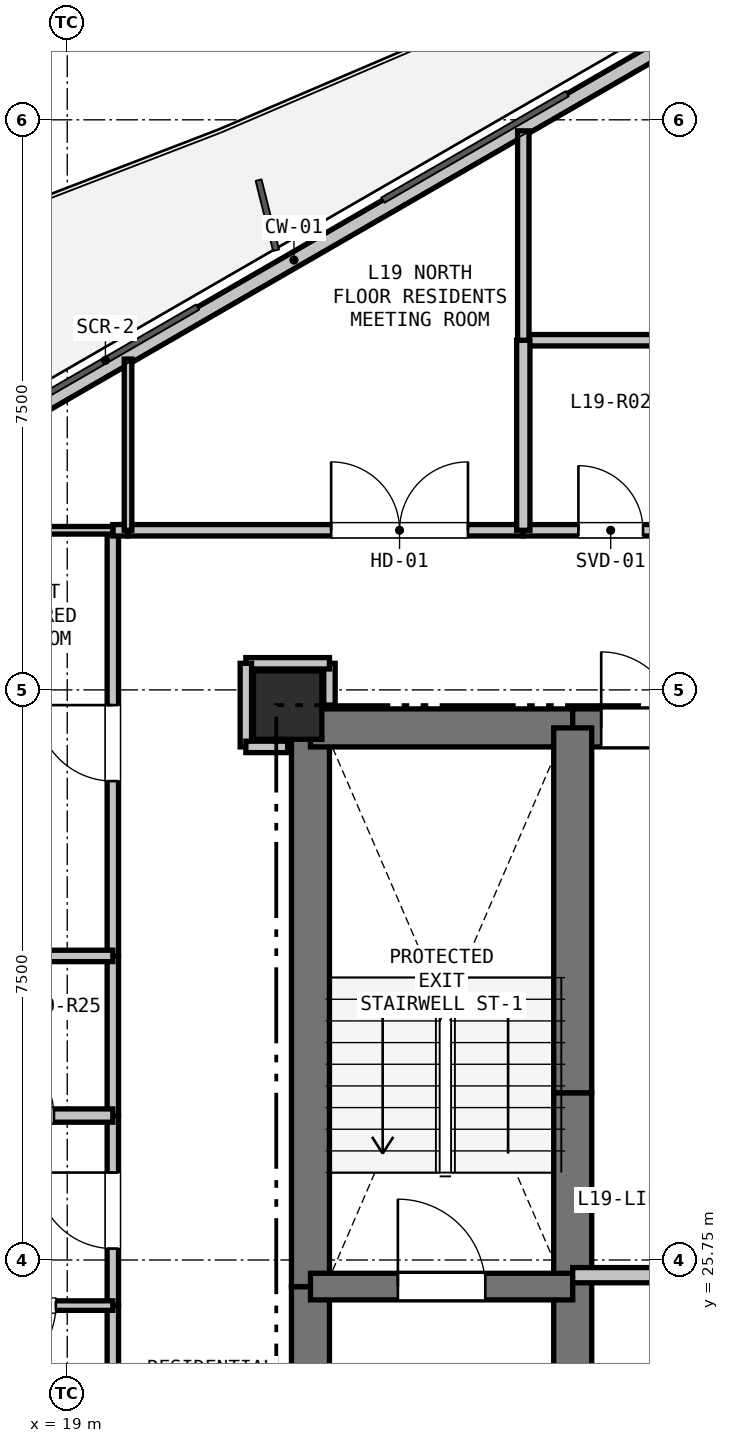
"""IFC4 building model, lengths in metres.
Left out: names, types, materials, properties, quantities, classifications, styles, units other than length and angle.
Written with IfcOpenShell. Run it as: python <this file> out.ifc"""

import sys

from ifc_helpers import new_model, si_unit, direction, frame, frame_2d, origin, origin_2d, place, context, subcontext, project, spatial, rectangle, extrude, element, fill, save


model = new_model("IFC4")
c1 = context("Model", 3, precision=1e-05, world=origin(), true_north=direction((0.0, 1.0)))
c2 = subcontext(c1, "Body", "Model", "MODEL_VIEW")
j1 = project(units=[si_unit("LENGTHUNIT", "METRE"), si_unit("PLANEANGLEUNIT", "RADIAN")], contexts=[c1])
p1 = place(None, origin())
s1 = spatial("IfcSite", under=j1, at=p1, CompositionType="ELEMENT")
p2 = place(p1, origin())
s2 = spatial("IfcBuilding", under=s1, at=p2, CompositionType="ELEMENT")
p3 = place(p2, frame((0.0, 0.0, 73.5)))
s3 = spatial("IfcBuildingStorey", under=s2, at=p3, CompositionType="ELEMENT", Elevation=73.5)
p4 = place(p3, frame((21.9, 33.05, 0.0), z_axis=(0.0, 0.0, 1.0), x_axis=(1.0, 0.0, 0.0)))
e1 = element("IfcColumn", 1, at=p4, inside=s3, PredefinedType="COLUMN", context=c2, shape_type="SweptSolid", body=[
    extrude(rectangle(XDim=0.9, YDim=0.9, at=origin_2d()), origin(), (0.0, 0.0, 1.0), 3.3),
])
p5 = place(p3, frame((17.12, 36.097, 0.0), z_axis=(0.0, 0.0, 1.0), x_axis=(0.866027010039, 0.499997217876, 0.0)))
e2 = element("IfcWall", 2, at=p5, inside=s3, PredefinedType="PARAPET", context=c2, shape_type="SweptSolid", body=[
    extrude(rectangle(XDim=11.229, YDim=0.2, at=frame_2d((5.615, 0.0))), origin(), (0.0, 0.0, 1.0), 0.2),
])
p6 = place(p3, frame((22.2, 20.75, 0.0), z_axis=(0.0, 0.0, 1.0), x_axis=(0.0, 1.0, 0.0)))
e3 = element("IfcWall", 3, at=p6, inside=s3, PredefinedType="SHEAR", context=c2, shape_type="SweptSolid", body=[
    extrude(rectangle(XDim=4.65, YDim=0.5, at=frame_2d((2.325, 0.0))), origin(), (0.0, 0.0, 1.0), 3.05),
])
p7 = place(p3, frame((22.2, 25.4, 0.0), z_axis=(0.0, 0.0, 1.0), x_axis=(0.0, 1.0, 0.0)))
e4 = element("IfcWall", 4, at=p7, inside=s3, PredefinedType="SHEAR", context=c2, shape_type="SweptSolid", body=[
    extrude(rectangle(XDim=7.35, YDim=0.5, at=frame_2d((3.675, 0.0))), origin(), (0.0, 0.0, 1.0), 3.05),
])
p8 = place(p3, frame((22.2, 32.75, 0.0), z_axis=(0.0, 0.0, 1.0), x_axis=(1.0, 0.0, 0.0)))
e5 = element("IfcWall", 5, at=p8, inside=s3, PredefinedType="SHEAR", context=c2, shape_type="SweptSolid", body=[
    extrude(rectangle(XDim=3.45, YDim=0.5, at=frame_2d((1.725, 0.0))), origin(), (0.0, 0.0, 1.0), 3.05),
])
p9 = place(p3, frame((25.65, 32.75, 0.0), z_axis=(0.0, 0.0, 1.0), x_axis=(1.0, 0.0, 0.0)))
e6 = element("IfcWall", 6, at=p9, inside=s3, PredefinedType="SHEAR", context=c2, shape_type="SweptSolid", body=[
    extrude(rectangle(XDim=1.75, YDim=0.5, at=frame_2d((0.875, 0.0))), origin(), (0.0, 0.0, 1.0), 3.05),
])
p10 = place(p9, frame((0.375, 0.0, 0.0)))
e7 = element("IfcOpeningElement", 7, at=p10, cuts=e6, PredefinedType="OPENING", context=c2, shape_type="SweptSolid", body=[
    extrude(rectangle(XDim=1.0, YDim=2.15, at=frame_2d((0.5, 1.075))), frame((0.0, 0.26, 0.0), z_axis=(0.0, -1.0, 0.0), x_axis=(1.0, 0.0, 0.0)), (0.0, 0.0, 1.0), 0.52),
])
p11 = place(p3, frame((25.65, 22.75, 0.0), z_axis=(0.0, 0.0, 1.0), x_axis=(0.0, 1.0, 0.0)))
e8 = element("IfcWall", 8, at=p11, inside=s3, PredefinedType="SHEAR", context=c2, shape_type="SweptSolid", body=[
    extrude(rectangle(XDim=2.8, YDim=0.5, at=frame_2d((1.4, 0.0))), origin(), (0.0, 0.0, 1.0), 3.05),
])
p12 = place(p3, frame((25.65, 25.55, 0.0), z_axis=(0.0, 0.0, 1.0), x_axis=(0.0, 1.0, 0.0)))
e9 = element("IfcWall", 9, at=p12, inside=s3, PredefinedType="SHEAR", context=c2, shape_type="SweptSolid", body=[
    extrude(rectangle(XDim=2.4, YDim=0.5, at=frame_2d((1.2, 0.0))), origin(), (0.0, 0.0, 1.0), 3.05),
])
p13 = place(p3, frame((25.65, 27.95, 0.0), z_axis=(0.0, 0.0, 1.0), x_axis=(0.0, 1.0, 0.0)))
e10 = element("IfcWall", 10, at=p13, inside=s3, PredefinedType="SHEAR", context=c2, shape_type="SweptSolid", body=[
    extrude(rectangle(XDim=4.8, YDim=0.5, at=frame_2d((2.4, 0.0))), origin(), (0.0, 0.0, 1.0), 3.05),
])
p14 = place(p3, frame((22.2, 25.4, 0.0), z_axis=(0.0, 0.0, 1.0), x_axis=(1.0, 0.0, 0.0)))
e11 = element("IfcWall", 11, at=p14, inside=s3, PredefinedType="SHEAR", context=c2, shape_type="SweptSolid", body=[
    extrude(rectangle(XDim=3.45, YDim=0.35, at=frame_2d((1.725, 0.0))), origin(), (0.0, 0.0, 1.0), 3.05),
])
p15 = place(p14, frame((1.15, 0.0, 0.0)))
e12 = element("IfcOpeningElement", 12, at=p15, cuts=e11, PredefinedType="OPENING", context=c2, shape_type="SweptSolid", body=[
    extrude(rectangle(XDim=1.15, YDim=2.15, at=frame_2d((0.575, 1.075))), frame((0.0, 0.185, 0.0), z_axis=(0.0, -1.0, 0.0), x_axis=(1.0, 0.0, 0.0)), (0.0, 0.0, 1.0), 0.37),
])
p16 = place(p3, frame((25.65, 25.55, 0.0), z_axis=(0.0, 0.0, 1.0), x_axis=(1.0, 0.0, 0.0)))
e13 = element("IfcWall", 13, at=p16, inside=s3, PredefinedType="PARTITIONING", context=c2, shape_type="SweptSolid", body=[
    extrude(rectangle(XDim=4.95, YDim=0.2, at=frame_2d((2.475, 0.0))), origin(), (0.0, 0.0, 1.0), 3.05),
])
p17 = place(p3, frame((19.6, 21.15, 0.0), z_axis=(0.0, 0.0, 1.0), x_axis=(0.0, 1.0, 0.0)))
e14 = element("IfcWall", 14, at=p17, inside=s3, PredefinedType="PARTITIONING", context=c2, shape_type="SweptSolid", body=[
    extrude(rectangle(XDim=4.0, YDim=0.15, at=frame_2d((2.0, 0.0))), origin(), (0.0, 0.0, 1.0), 2.423),
])
p18 = place(p3, frame((19.6, 25.15, 0.0), z_axis=(0.0, 0.0, 1.0), x_axis=(0.0, 1.0, 0.0)))
e15 = element("IfcWall", 15, at=p18, inside=s3, PredefinedType="PARTITIONING", context=c2, shape_type="SweptSolid", body=[
    extrude(rectangle(XDim=2.5, YDim=0.15, at=frame_2d((1.25, 0.0))), origin(), (0.0, 0.0, 1.0), 3.05),
])
p19 = place(p18, frame((0.75, 0.0, 0.0)))
e16 = element("IfcOpeningElement", 16, at=p19, cuts=e15, PredefinedType="OPENING", context=c2, shape_type="SweptSolid", body=[
    extrude(rectangle(XDim=1.0, YDim=2.15, at=frame_2d((0.5, 1.075))), frame((0.0, 0.085, 0.0), z_axis=(0.0, -1.0, 0.0), x_axis=(1.0, 0.0, 0.0)), (0.0, 0.0, 1.0), 0.17),
])
p20 = place(p3, frame((19.6, 27.65, 0.0), z_axis=(0.0, 0.0, 1.0), x_axis=(0.0, 1.0, 0.0)))
e17 = element("IfcWall", 17, at=p20, inside=s3, PredefinedType="PARTITIONING", context=c2, shape_type="SweptSolid", body=[
    extrude(rectangle(XDim=2.1, YDim=0.15, at=frame_2d((1.05, 0.0))), origin(), (0.0, 0.0, 1.0), 3.05),
])
p21 = place(p3, frame((19.6, 29.75, 0.0), z_axis=(0.0, 0.0, 1.0), x_axis=(0.0, 1.0, 0.0)))
e18 = element("IfcWall", 18, at=p21, inside=s3, PredefinedType="PARTITIONING", context=c2, shape_type="SweptSolid", body=[
    extrude(rectangle(XDim=5.6, YDim=0.15, at=frame_2d((2.8, 0.0))), origin(), (0.0, 0.0, 1.0), 2.423),
])
p22 = place(p21, frame((2.3, 0.0, 0.0)))
e19 = element("IfcOpeningElement", 19, at=p22, cuts=e18, PredefinedType="OPENING", context=c2, shape_type="SweptSolid", body=[
    extrude(rectangle(XDim=1.0, YDim=2.15, at=frame_2d((0.5, 1.075))), frame((0.0, 0.085, 0.0), z_axis=(0.0, -1.0, 0.0), x_axis=(1.0, 0.0, 0.0)), (0.0, 0.0, 1.0), 0.17),
])
p23 = place(p3, frame((19.6, 35.35, 0.0), z_axis=(0.0, 0.0, 1.0), x_axis=(1.0, 0.0, 0.0)))
e20 = element("IfcWall", 20, at=p23, inside=s3, PredefinedType="PARTITIONING", context=c2, shape_type="SweptSolid", body=[
    extrude(rectangle(XDim=0.2, YDim=0.15, at=frame_2d((0.1, 0.0))), origin(), (0.0, 0.0, 1.0), 3.05),
])
p24 = place(p3, frame((19.8, 35.35, 0.0), z_axis=(0.0, 0.0, 1.0), x_axis=(1.0, 0.0, 0.0)))
e21 = element("IfcWall", 21, at=p24, inside=s3, PredefinedType="PARTITIONING", context=c2, shape_type="SweptSolid", body=[
    extrude(rectangle(XDim=5.2, YDim=0.15, at=frame_2d((2.6, 0.0))), origin(), (0.0, 0.0, 1.0), 3.05),
])
p25 = place(p24, frame((2.672, 0.0, 0.0)))
e22 = element("IfcOpeningElement", 22, at=p25, cuts=e21, PredefinedType="OPENING", context=c2, shape_type="SweptSolid", body=[
    extrude(rectangle(XDim=1.8, YDim=2.2, at=frame_2d((0.9, 1.1))), frame((0.0, 0.085, 0.0), z_axis=(0.0, -1.0, 0.0), x_axis=(1.0, 0.0, 0.0)), (0.0, 0.0, 1.0), 0.17),
])
p26 = place(p3, frame((25.0, 35.35, 0.0), z_axis=(0.0, 0.0, 1.0), x_axis=(1.0, 0.0, 0.0)))
e23 = element("IfcWall", 23, at=p26, inside=s3, PredefinedType="PARTITIONING", context=c2, shape_type="SweptSolid", body=[
    extrude(rectangle(XDim=2.3, YDim=0.15, at=frame_2d((1.15, 0.0))), origin(), (0.0, 0.0, 1.0), 3.05),
])
p27 = place(p26, frame((0.725, 0.0, 0.0)))
e24 = element("IfcOpeningElement", 24, at=p27, cuts=e23, PredefinedType="OPENING", context=c2, shape_type="SweptSolid", body=[
    extrude(rectangle(XDim=0.85, YDim=2.1, at=frame_2d((0.425, 1.05))), frame((0.0, 0.085, 0.0), z_axis=(0.0, -1.0, 0.0), x_axis=(1.0, 0.0, 0.0)), (0.0, 0.0, 1.0), 0.17),
])
p28 = place(p3, frame((22.45, 33.05, 0.0), z_axis=(0.0, 0.0, 1.0), x_axis=(0.0, 1.0, 0.0)))
e25 = element("IfcWall", 25, at=p28, inside=s3, PredefinedType="PARTITIONING", context=c2, shape_type="SweptSolid", body=[
    extrude(rectangle(XDim=0.55, YDim=0.15, at=frame_2d((0.275, 0.0))), origin(), (0.0, 0.0, 1.0), 2.498),
])
p29 = place(p3, frame((22.45, 33.6, 0.0), z_axis=(0.0, 0.0, 1.0), x_axis=(-1.0, 0.0, 0.0)))
e26 = element("IfcWall", 26, at=p29, inside=s3, PredefinedType="PARTITIONING", context=c2, shape_type="SweptSolid", body=[
    extrude(rectangle(XDim=1.1, YDim=0.15, at=frame_2d((0.55, 0.0))), origin(), (0.0, 0.0, 1.0), 3.05),
])
p30 = place(p3, frame((21.35, 33.6, 0.0), z_axis=(0.0, 0.0, 1.0), x_axis=(0.0, -1.0, 0.0)))
e27 = element("IfcWall", 27, at=p30, inside=s3, PredefinedType="PARTITIONING", context=c2, shape_type="SweptSolid", body=[
    extrude(rectangle(XDim=1.1, YDim=0.15, at=frame_2d((0.55, 0.0))), origin(), (0.0, 0.0, 1.0), 2.423),
])
p31 = place(p3, frame((21.35, 32.5, 0.0), z_axis=(0.0, 0.0, 1.0), x_axis=(1.0, 0.0, 0.0)))
e28 = element("IfcWall", 28, at=p31, inside=s3, PredefinedType="PARTITIONING", context=c2, shape_type="SweptSolid", body=[
    extrude(rectangle(XDim=0.55, YDim=0.15, at=frame_2d((0.275, 0.0))), origin(), (0.0, 0.0, 1.0), 2.498),
])
p32 = place(p3, frame((17.15, 27.65, 0.0), z_axis=(0.0, 0.0, 1.0), x_axis=(1.0, 0.0, 0.0)))
e29 = element("IfcWall", 29, at=p32, inside=s3, PredefinedType="PLUMBINGWALL", context=c2, shape_type="SweptSolid", body=[
    extrude(rectangle(XDim=2.45, YDim=0.175, at=frame_2d((1.225, 0.0))), origin(), (0.0, 0.0, 1.0), 3.05),
])
p33 = place(p32, frame((0.775, 0.0, 0.0)))
e30 = element("IfcOpeningElement", 30, at=p33, cuts=e29, PredefinedType="OPENING", context=c2, shape_type="SweptSolid", body=[
    extrude(rectangle(XDim=0.9, YDim=2.1, at=frame_2d((0.45, 1.05))), frame((0.0, 0.097, 0.0), z_axis=(0.0, -1.0, 0.0), x_axis=(1.0, 0.0, 0.0)), (0.0, 0.0, 1.0), 0.195),
])
p34 = place(p3, frame((19.6, 25.15, 0.0), z_axis=(0.0, 0.0, 1.0), x_axis=(-1.0, 0.0, 0.0)))
e31 = element("IfcWall", 31, at=p34, inside=s3, PredefinedType="PARTITIONING", context=c2, shape_type="SweptSolid", body=[
    extrude(rectangle(XDim=2.45, YDim=0.125, at=frame_2d((1.225, 0.0))), origin(), (0.0, 0.0, 1.0), 3.05),
])
p35 = place(p34, frame((0.75, 0.0, 0.0)))
e32 = element("IfcOpeningElement", 32, at=p35, cuts=e31, PredefinedType="OPENING", context=c2, shape_type="SweptSolid", body=[
    extrude(rectangle(XDim=0.95, YDim=2.1, at=frame_2d((0.475, 1.05))), frame((0.0, 0.073, 0.0), z_axis=(0.0, -1.0, 0.0), x_axis=(1.0, 0.0, 0.0)), (0.0, 0.0, 1.0), 0.145),
])
p36 = place(p3, frame((25.0, 37.85, 0.0), z_axis=(0.0, 0.0, 1.0), x_axis=(1.0, 0.0, 0.0)))
e33 = element("IfcWall", 33, at=p36, inside=s3, PredefinedType="PARTITIONING", context=c2, shape_type="SweptSolid", body=[
    extrude(rectangle(XDim=2.3, YDim=0.15, at=frame_2d((1.15, 0.0))), origin(), (0.0, 0.0, 1.0), 3.05),
])
p37 = place(p3, frame((25.0, 35.35, 0.0), z_axis=(0.0, 0.0, 1.0), x_axis=(0.0, 1.0, 0.0)))
e34 = element("IfcWall", 34, at=p37, inside=s3, PredefinedType="PLUMBINGWALL", context=c2, shape_type="SweptSolid", body=[
    extrude(rectangle(XDim=2.5, YDim=0.175, at=frame_2d((1.25, 0.0))), origin(), (0.0, 0.0, 1.0), 3.05),
])
p38 = place(p3, frame((17.15, 29.75, 0.0), z_axis=(0.0, 0.0, 1.0), x_axis=(1.0, 0.0, 0.0)))
e35 = element("IfcWall", 35, at=p38, inside=s3, PredefinedType="PARTITIONING", context=c2, shape_type="SweptSolid", body=[
    extrude(rectangle(XDim=2.45, YDim=0.15, at=frame_2d((1.225, 0.0))), origin(), (0.0, 0.0, 1.0), 3.05),
])
p39 = place(p3, frame((25.0, 40.605, 0.0), z_axis=(0.0, 0.0, 1.0), x_axis=(0.0, -1.0, 0.0)))
e36 = element("IfcWall", 36, at=p39, inside=s3, PredefinedType="PARTITIONING", context=c2, shape_type="SweptSolid", body=[
    extrude(rectangle(XDim=2.755, YDim=0.15, at=frame_2d((1.377, 0.0))), origin(), (0.0, 0.0, 1.0), 2.365),
])
p40 = place(p3, frame((19.8, 35.35, 0.0), z_axis=(0.0, 0.0, 1.0), x_axis=(0.0, 1.0, 0.0)))
e37 = element("IfcWall", 37, at=p40, inside=s3, PredefinedType="PARTITIONING", context=c2, shape_type="SweptSolid", body=[
    extrude(rectangle(XDim=2.252, YDim=0.1, at=frame_2d((1.126, 0.0))), origin(), (0.0, 0.0, 1.0), 2.365),
])
p41 = place(p3, frame((17.15, 35.35, 0.0), z_axis=(0.0, 0.0, 1.0), x_axis=(1.0, 0.0, 0.0)))
e38 = element("IfcWall", 38, at=p41, inside=s3, PredefinedType="PARTITIONING", context=c2, shape_type="SweptSolid", body=[
    extrude(rectangle(XDim=2.45, YDim=0.1, at=frame_2d((1.225, 0.0))), origin(), (0.0, 0.0, 1.0), 2.365),
])
p42 = place(p10, origin())
e39 = element("IfcDoor", 39, at=p42, inside=s3, OperationType="SINGLE_SWING_LEFT", PredefinedType="DOOR", context=c2, shape_type="SweptSolid", body=[
    extrude(rectangle(XDim=1.0, YDim=2.15, at=frame_2d((0.5, 1.075))), frame((0.0, 0.025, 0.0), z_axis=(0.0, -1.0, 0.0), x_axis=(1.0, 0.0, 0.0)), (0.0, 0.0, 1.0), 0.05),
])
fill(e7, e39)
p43 = place(p15, origin())
e40 = element("IfcDoor", 40, at=p43, inside=s3, OperationType="SINGLE_SWING_LEFT", PredefinedType="DOOR", context=c2, shape_type="SweptSolid", body=[
    extrude(rectangle(XDim=1.15, YDim=2.15, at=frame_2d((0.575, 1.075))), frame((0.0, 0.025, 0.0), z_axis=(0.0, -1.0, 0.0), x_axis=(1.0, 0.0, 0.0)), (0.0, 0.0, 1.0), 0.05),
])
fill(e12, e40)
p44 = place(p19, origin())
e41 = element("IfcDoor", 41, at=p44, inside=s3, OperationType="SINGLE_SWING_RIGHT", PredefinedType="DOOR", context=c2, shape_type="SweptSolid", body=[
    extrude(rectangle(XDim=1.0, YDim=2.15, at=frame_2d((0.5, 1.075))), frame((0.0, 0.025, 0.0), z_axis=(0.0, -1.0, 0.0), x_axis=(1.0, 0.0, 0.0)), (0.0, 0.0, 1.0), 0.05),
])
fill(e16, e41)
p45 = place(p27, origin())
e42 = element("IfcDoor", 42, at=p45, inside=s3, OperationType="SINGLE_SWING_LEFT", PredefinedType="DOOR", context=c2, shape_type="SweptSolid", body=[
    extrude(rectangle(XDim=0.85, YDim=2.1, at=frame_2d((0.425, 1.05))), frame((0.0, 0.025, 0.0), z_axis=(0.0, -1.0, 0.0), x_axis=(1.0, 0.0, 0.0)), (0.0, 0.0, 1.0), 0.05),
])
fill(e24, e42)
p46 = place(p25, origin())
e43 = element("IfcDoor", 43, at=p46, inside=s3, OperationType="DOUBLE_DOOR_SINGLE_SWING", PredefinedType="DOOR", context=c2, shape_type="SweptSolid", body=[
    extrude(rectangle(XDim=1.8, YDim=2.2, at=frame_2d((0.9, 1.1))), frame((0.0, 0.025, 0.0), z_axis=(0.0, -1.0, 0.0), x_axis=(1.0, 0.0, 0.0)), (0.0, 0.0, 1.0), 0.05),
])
fill(e22, e43)
p47 = place(p22, origin())
e44 = element("IfcDoor", 44, at=p47, inside=s3, OperationType="SINGLE_SWING_RIGHT", PredefinedType="DOOR", context=c2, shape_type="SweptSolid", body=[
    extrude(rectangle(XDim=1.0, YDim=2.15, at=frame_2d((0.5, 1.075))), frame((0.0, 0.025, 0.0), z_axis=(0.0, -1.0, 0.0), x_axis=(1.0, 0.0, 0.0)), (0.0, 0.0, 1.0), 0.05),
])
fill(e19, e44)
p48 = place(p33, origin())
e45 = element("IfcDoor", 45, at=p48, inside=s3, OperationType="SINGLE_SWING_LEFT", PredefinedType="DOOR", context=c2, shape_type="SweptSolid", body=[
    extrude(rectangle(XDim=0.9, YDim=2.1, at=frame_2d((0.45, 1.05))), frame((0.0, 0.025, 0.0), z_axis=(0.0, -1.0, 0.0), x_axis=(1.0, 0.0, 0.0)), (0.0, 0.0, 1.0), 0.05),
])
fill(e30, e45)
p49 = place(p35, origin())
e46 = element("IfcDoor", 46, at=p49, inside=s3, OperationType="SINGLE_SWING_RIGHT", PredefinedType="DOOR", context=c2, shape_type="SweptSolid", body=[
    extrude(rectangle(XDim=0.95, YDim=2.1, at=frame_2d((0.475, 1.05))), frame((0.0, 0.025, 0.0), z_axis=(0.0, -1.0, 0.0), x_axis=(1.0, 0.0, 0.0)), (0.0, 0.0, 1.0), 0.05),
])
fill(e32, e46)
save(model, sys.argv[1])
